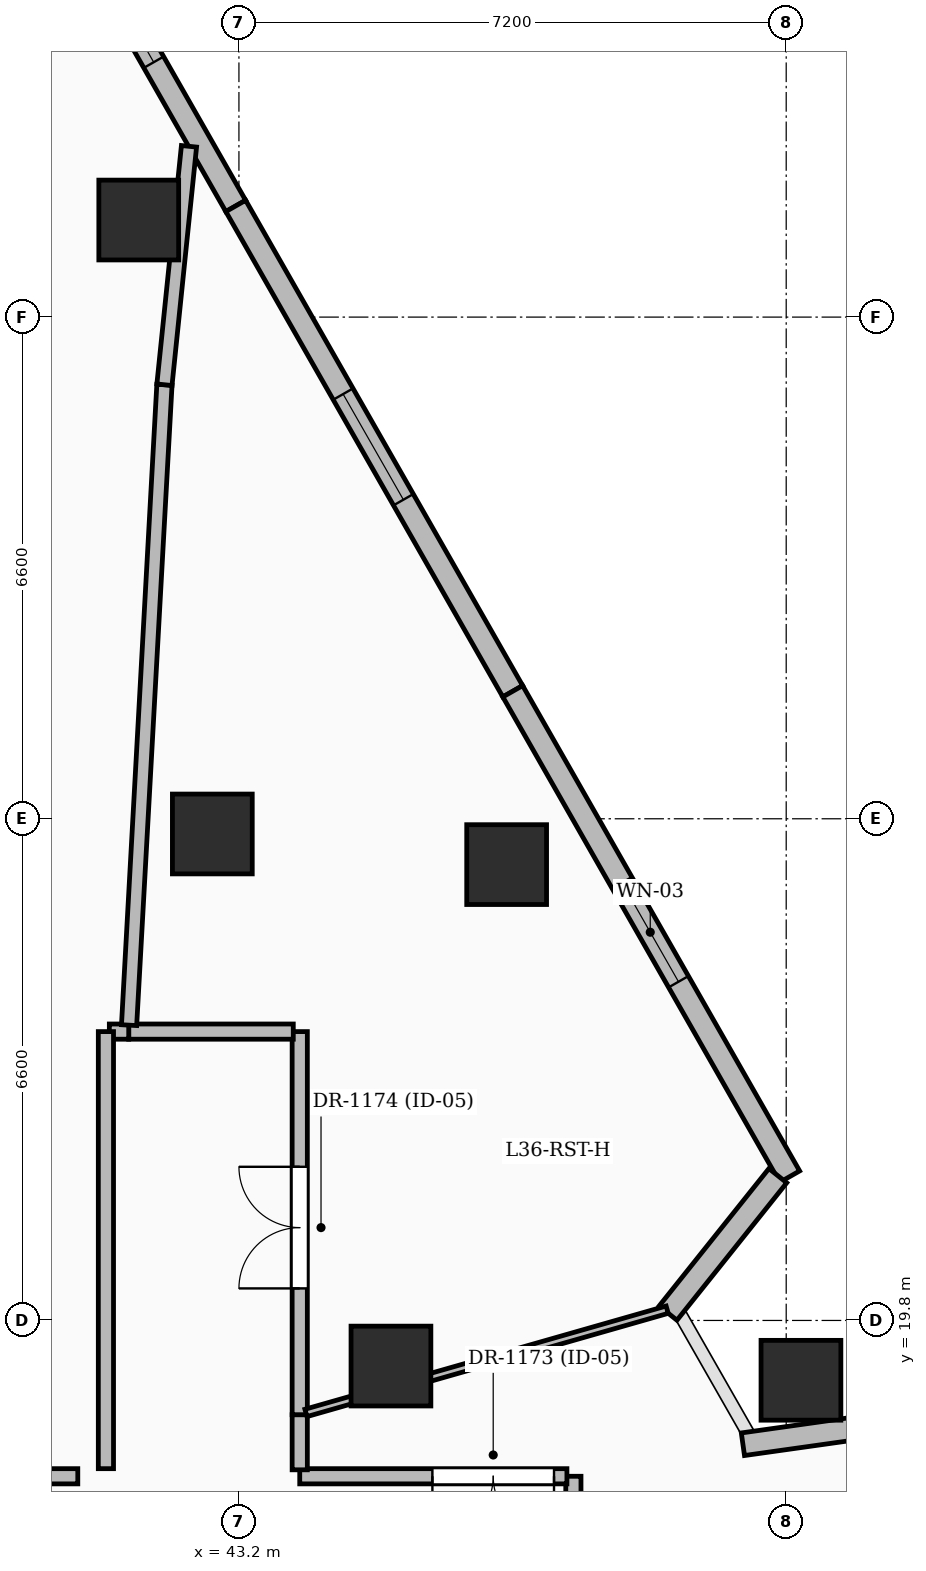
"""IFC4 building model, lengths in metres.
Left out: names, types, materials, properties, quantities, classifications, styles, units other than length and angle.
Written with IfcOpenShell. Run it as: python <this file> out.ifc"""

import sys

from ifc_helpers import new_model, si_unit, direction, frame, frame_2d, origin, origin_2d, place, context, subcontext, project, spatial, rectangle, extrude, element, fill, save


model = new_model("IFC4")
c1 = context("Model", 3, precision=1e-05, world=origin(), true_north=direction((0.0, 1.0)))
c2 = subcontext(c1, "Body", "Model", "MODEL_VIEW")
j1 = project(units=[si_unit("LENGTHUNIT", "METRE"), si_unit("PLANEANGLEUNIT", "RADIAN")], contexts=[c1])
p1 = place(None, origin())
s1 = spatial("IfcSite", under=j1, at=p1, CompositionType="ELEMENT")
p2 = place(p1, origin())
s2 = spatial("IfcBuilding", under=s1, at=p2, CompositionType="ELEMENT")
p3 = place(p2, frame((0.0, 0.0, 142.8)))
s3 = spatial("IfcBuildingStorey", under=s2, at=p3, CompositionType="ELEMENT", Elevation=142.8)
for number, where, z_axis, x_axis in (
    (1, (45.2, 19.2, 0.0), (0.0, 0.0, 1.0), (1.0, 0.0, 0.0)),
    (2, (42.85, 26.2, 0.0), (0.0, 0.0, 1.0), (1.0, 0.0, 0.0)),
    (3, (50.594, 19.013, 0.0), (0.0, 0.0, 1.0), (1.0, 0.0, 0.0)),
    (4, (46.722, 25.797, 0.0), (0.0, 0.0, 1.0), (1.0, 0.0, 0.0)),
    (5, (41.882, 34.277, 0.0), (0.0, 0.0, 1.0), (1.0, 0.0, 0.0)),
):
    element("IfcColumn", number, at=place(p3, frame(where, z_axis=z_axis, x_axis=x_axis)), inside=s3, PredefinedType="COLUMN", context=c2, shape_type="SweptSolid", body=[
        extrude(rectangle(XDim=1.05, YDim=1.05, at=origin_2d()), origin(), (0.0, 0.0, 1.0), 3.6),
    ])
p4 = place(p3, frame((39.804, 40.34, 0.0), z_axis=(0.0, 0.0, 1.0), x_axis=(0.495676513751, -0.868507221453, 0.0)))
e6 = element("IfcWall", 6, at=p4, inside=s3, PredefinedType="SOLIDWALL", context=c2, shape_type="SweptSolid", body=[
    extrude(rectangle(XDim=6.767, YDim=0.3, at=frame_2d((3.384, 0.0))), origin(), (0.0, 0.0, 1.0), 3.35),
])
p5 = place(p4, frame((2.79, 0.0, 0.6)))
e7 = element("IfcOpeningElement", 7, at=p5, cuts=e6, PredefinedType="OPENING", context=c2, shape_type="SweptSolid", body=[
    extrude(rectangle(XDim=1.8, YDim=2.1, at=frame_2d((0.9, 1.05))), frame((0.0, 0.16, 0.0), z_axis=(0.0, -1.0, 0.0), x_axis=(1.0, 0.0, 0.0)), (0.0, 0.0, 1.0), 0.32),
])
p6 = place(p3, frame((43.158, 34.462, 0.0), z_axis=(0.0, 0.0, 1.0), x_axis=(0.495673944594, -0.868508687723, 0.0)))
e8 = element("IfcWall", 8, at=p6, inside=s3, PredefinedType="SOLIDWALL", context=c2, shape_type="SweptSolid", body=[
    extrude(rectangle(XDim=7.352, YDim=0.3, at=frame_2d((3.676, 0.0))), origin(), (0.0, 0.0, 1.0), 3.35),
])
p7 = place(p6, frame((2.85, 0.0, 0.55)))
e9 = element("IfcOpeningElement", 9, at=p7, cuts=e8, PredefinedType="OPENING", context=c2, shape_type="SweptSolid", body=[
    extrude(rectangle(XDim=1.6, YDim=2.2, at=frame_2d((0.8, 1.1))), frame((0.0, 0.16, 0.0), z_axis=(0.0, -1.0, 0.0), x_axis=(1.0, 0.0, 0.0)), (0.0, 0.0, 1.0), 0.32),
])
p8 = place(p3, frame((46.802, 28.077, 0.0), z_axis=(0.0, 0.0, 1.0), x_axis=(0.495698993586, -0.868494391322, 0.0)))
e10 = element("IfcWall", 10, at=p8, inside=s3, PredefinedType="SOLIDWALL", context=c2, shape_type="SweptSolid", body=[
    extrude(rectangle(XDim=7.352, YDim=0.3, at=frame_2d((3.676, 0.0))), origin(), (0.0, 0.0, 1.0), 3.35),
])
p9 = place(p8, frame((2.9, 0.0, 0.6)))
e11 = element("IfcOpeningElement", 11, at=p9, cuts=e10, PredefinedType="OPENING", context=c2, shape_type="SweptSolid", body=[
    extrude(rectangle(XDim=1.5, YDim=2.1, at=frame_2d((0.75, 1.05))), frame((0.0, 0.16, 0.0), z_axis=(0.0, -1.0, 0.0), x_axis=(1.0, 0.0, 0.0)), (0.0, 0.0, 1.0), 0.32),
])
p10 = place(p3, frame((50.29, 21.705, 0.0), z_axis=(0.0, 0.0, 1.0), x_axis=(-0.624064384905, -0.781372922165, 0.0)))
e12 = element("IfcWall", 12, at=p10, inside=s3, PredefinedType="SOLIDWALL", context=c2, shape_type="SweptSolid", body=[
    extrude(rectangle(XDim=2.314, YDim=0.3, at=frame_2d((1.157, 0.0))), origin(), (0.0, 0.0, 1.0), 2.575),
])
p11 = place(p3, frame((49.83, 18.171, 0.0), z_axis=(0.0, 0.0, 1.0), x_axis=(0.990216802577, 0.139537392457, 0.0)))
e13 = element("IfcWall", 13, at=p11, inside=s3, PredefinedType="SOLIDWALL", context=c2, shape_type="SweptSolid", body=[
    extrude(rectangle(XDim=2.595, YDim=0.3, at=frame_2d((1.297, 0.0))), origin(), (0.0, 0.0, 1.0), 2.398),
])
p12 = place(p3, frame((47.6, 17.17, 0.0), z_axis=(0.0, 0.0, 1.0), x_axis=(0.0, 1.0, 0.0)))
e14 = element("IfcWall", 14, at=p12, inside=s3, PredefinedType="PARTITIONING", context=c2, shape_type="SweptSolid", body=[
    extrude(rectangle(XDim=0.58, YDim=0.2, at=frame_2d((0.29, 0.0))), origin(), (0.0, 0.0, 1.0), 3.35),
])
p13 = place(p3, frame((47.515, 17.75, 0.0), z_axis=(0.0, 0.0, 1.0), x_axis=(-1.0, 0.0, 0.0)))
e15 = element("IfcWall", 15, at=p13, inside=s3, PredefinedType="PARTITIONING", context=c2, shape_type="SweptSolid", body=[
    extrude(rectangle(XDim=3.515, YDim=0.2, at=frame_2d((1.757, 0.0))), origin(), (0.0, 0.0, 1.0), 2.436),
])
p14 = place(p13, frame((0.17, 0.0, 0.0)))
e16 = element("IfcOpeningElement", 16, at=p14, cuts=e15, PredefinedType="OPENING", context=c2, shape_type="SweptSolid", body=[
    extrude(rectangle(XDim=1.6, YDim=2.3, at=frame_2d((0.8, 1.15))), frame((0.0, 0.11, 0.0), z_axis=(0.0, -1.0, 0.0), x_axis=(1.0, 0.0, 0.0)), (0.0, 0.0, 1.0), 0.22),
])
p15 = place(p3, frame((44.0, 17.835, 0.0), z_axis=(0.0, 0.0, 1.0), x_axis=(0.0, 1.0, 0.0)))
e17 = element("IfcWall", 17, at=p15, inside=s3, PredefinedType="PARTITIONING", context=c2, shape_type="SweptSolid", body=[
    extrude(rectangle(XDim=0.725, YDim=0.2, at=frame_2d((0.363, 0.0))), origin(), (0.0, 0.0, 1.0), 3.35),
])
p16 = place(p3, frame((44.0, 18.56, 0.0), z_axis=(0.0, 0.0, 1.0), x_axis=(0.0, 1.0, 0.0)))
e18 = element("IfcWall", 18, at=p16, inside=s3, PredefinedType="PARTITIONING", context=c2, shape_type="SweptSolid", body=[
    extrude(rectangle(XDim=5.04, YDim=0.2, at=frame_2d((2.52, 0.0))), origin(), (0.0, 0.0, 1.0), 2.436),
])
p17 = place(p16, frame((1.662, 0.0, 0.0)))
e19 = element("IfcOpeningElement", 19, at=p17, cuts=e18, PredefinedType="OPENING", context=c2, shape_type="SweptSolid", body=[
    extrude(rectangle(XDim=1.6, YDim=2.3, at=frame_2d((0.8, 1.15))), frame((0.0, 0.11, 0.0), z_axis=(0.0, -1.0, 0.0), x_axis=(1.0, 0.0, 0.0)), (0.0, 0.0, 1.0), 0.22),
])
p18 = place(p3, frame((43.915, 23.6, 0.0), z_axis=(0.0, 0.0, 1.0), x_axis=(-1.0, 0.0, 0.0)))
e20 = element("IfcWall", 20, at=p18, inside=s3, PredefinedType="PARTITIONING", context=c2, shape_type="SweptSolid", body=[
    extrude(rectangle(XDim=2.165, YDim=0.2, at=frame_2d((1.083, 0.0))), origin(), (0.0, 0.0, 1.0), 2.436),
])
p19 = place(p3, frame((41.08, 17.75, 0.0), z_axis=(0.0, 0.0, 1.0), x_axis=(-1.0, 0.0, 0.0)))
e21 = element("IfcWall", 21, at=p19, inside=s3, PredefinedType="PARTITIONING", context=c2, shape_type="SweptSolid", body=[
    extrude(rectangle(XDim=3.73, YDim=0.2, at=frame_2d((1.865, 0.0))), origin(), (0.0, 0.0, 1.0), 3.35),
])
p20 = place(p3, frame((41.75, 23.6, 0.0), z_axis=(0.0, 0.0, 1.0), x_axis=(-1.0, 0.0, 0.0)))
e22 = element("IfcWall", 22, at=p20, inside=s3, PredefinedType="PARTITIONING", context=c2, shape_type="SweptSolid", body=[
    extrude(rectangle(XDim=0.255, YDim=0.2, at=frame_2d((0.127, 0.0))), origin(), (0.0, 0.0, 1.0), 3.35),
])
p21 = place(p3, frame((41.45, 23.6, 0.0), z_axis=(0.0, 0.0, 1.0), x_axis=(0.0, -1.0, 0.0)))
e23 = element("IfcWall", 23, at=p21, inside=s3, PredefinedType="PARTITIONING", context=c2, shape_type="SweptSolid", body=[
    extrude(rectangle(XDim=5.75, YDim=0.2, at=frame_2d((2.875, 0.0))), origin(), (0.0, 0.0, 1.0), 3.35),
])
p22 = place(p3, frame((48.834, 19.942, 0.0), z_axis=(0.0, 0.0, 1.0), x_axis=(-0.961503440743, -0.274792891901, 0.0)))
e24 = element("IfcWall", 24, at=p22, inside=s3, PredefinedType="PARTITIONING", context=c2, shape_type="SweptSolid", body=[
    extrude(rectangle(XDim=4.942, YDim=0.1, at=frame_2d((2.471, 0.0))), origin(), (0.0, 0.0, 1.0), 2.771),
])
p23 = place(p3, frame((42.22, 32.11, 0.0), z_axis=(0.0, 0.0, 1.0), x_axis=(-0.055146323059, -0.998478283716, 0.0)))
e25 = element("IfcWall", 25, at=p23, inside=s3, PredefinedType="PARTITIONING", context=c2, shape_type="SweptSolid", body=[
    extrude(rectangle(XDim=8.438, YDim=0.2, at=frame_2d((4.219, 0.0))), origin(), (0.0, 0.0, 1.0), 2.393),
])
p24 = place(p3, frame((42.543, 35.247, 0.0), z_axis=(0.0, 0.0, 1.0), x_axis=(-0.102423703174, -0.994740863254, 0.0)))
e26 = element("IfcWall", 26, at=p24, inside=s3, PredefinedType="PARTITIONING", context=c2, shape_type="SweptSolid", body=[
    extrude(rectangle(XDim=3.154, YDim=0.2, at=frame_2d((1.577, 0.0))), origin(), (0.0, 0.0, 1.0), 2.393),
])
p25 = place(p5, origin())
e27 = element("IfcWindow", 27, at=p25, inside=s3, PartitioningType="SINGLE_PANEL", PredefinedType="WINDOW", context=c2, shape_type="SweptSolid", body=[
    extrude(rectangle(XDim=1.8, YDim=2.1, at=frame_2d((0.9, 1.05))), frame((0.0, 0.03, 0.0), z_axis=(0.0, -1.0, 0.0), x_axis=(1.0, 0.0, 0.0)), (0.0, 0.0, 1.0), 0.06),
])
fill(e7, e27)
p26 = place(p7, origin())
e28 = element("IfcWindow", 28, at=p26, inside=s3, PartitioningType="SINGLE_PANEL", PredefinedType="WINDOW", context=c2, shape_type="SweptSolid", body=[
    extrude(rectangle(XDim=1.6, YDim=2.2, at=frame_2d((0.8, 1.1))), frame((0.0, 0.03, 0.0), z_axis=(0.0, -1.0, 0.0), x_axis=(1.0, 0.0, 0.0)), (0.0, 0.0, 1.0), 0.06),
])
fill(e9, e28)
p27 = place(p9, origin())
e29 = element("IfcWindow", 29, at=p27, inside=s3, PartitioningType="SINGLE_PANEL", PredefinedType="WINDOW", context=c2, shape_type="SweptSolid", body=[
    extrude(rectangle(XDim=1.5, YDim=2.1, at=frame_2d((0.75, 1.05))), frame((0.0, 0.03, 0.0), z_axis=(0.0, -1.0, 0.0), x_axis=(1.0, 0.0, 0.0)), (0.0, 0.0, 1.0), 0.06),
])
fill(e11, e29)
p28 = place(p14, origin())
e30 = element("IfcDoor", 30, at=p28, inside=s3, OperationType="DOUBLE_DOOR_SINGLE_SWING", PredefinedType="DOOR", context=c2, shape_type="SweptSolid", body=[
    extrude(rectangle(XDim=1.6, YDim=2.3, at=frame_2d((0.8, 1.15))), frame((0.0, 0.025, 0.0), z_axis=(0.0, -1.0, 0.0), x_axis=(1.0, 0.0, 0.0)), (0.0, 0.0, 1.0), 0.05),
])
fill(e16, e30)
p29 = place(p17, origin())
e31 = element("IfcDoor", 31, at=p29, inside=s3, OperationType="DOUBLE_DOOR_SINGLE_SWING", PredefinedType="DOOR", context=c2, shape_type="SweptSolid", body=[
    extrude(rectangle(XDim=1.6, YDim=2.3, at=frame_2d((0.8, 1.15))), frame((0.0, 0.025, 0.0), z_axis=(0.0, -1.0, 0.0), x_axis=(1.0, 0.0, 0.0)), (0.0, 0.0, 1.0), 0.05),
])
fill(e19, e31)
save(model, sys.argv[1])
